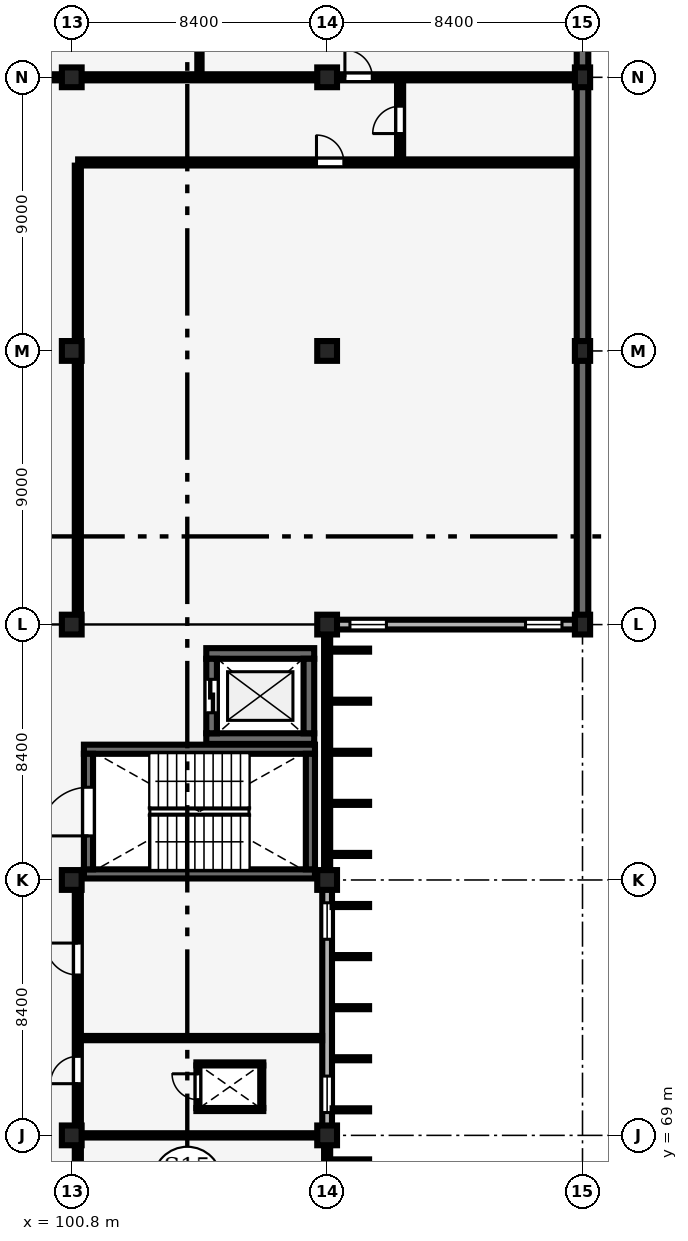
"""IFC4 building model, lengths in metres.
Left out: names, types, materials, properties, quantities, classifications, styles, units other than length and angle.
Written with IfcOpenShell. Run it as: python <this file> out.ifc"""

import sys

from ifc_helpers import new_model, si_unit, direction, frame, frame_2d, origin, origin_2d, place, context, subcontext, project, spatial, rectangle, extrude, element, fill, save


model = new_model("IFC4")
c1 = context("Model", 3, precision=1e-05, world=origin(), true_north=direction((0.0, 1.0)))
c2 = subcontext(c1, "Body", "Model", "MODEL_VIEW")
j1 = project(units=[si_unit("LENGTHUNIT", "METRE"), si_unit("PLANEANGLEUNIT", "RADIAN")], contexts=[c1])
p1 = place(None, origin())
s1 = spatial("IfcSite", under=j1, at=p1, CompositionType="ELEMENT")
p2 = place(p1, origin())
s2 = spatial("IfcBuilding", under=s1, at=p2, CompositionType="ELEMENT")
p3 = place(p2, frame((0.0, 0.0, 4.8)))
s3 = spatial("IfcBuildingStorey", under=s2, at=p3, CompositionType="ELEMENT", Elevation=4.8)
for number, where, z_axis, x_axis in (
    (1, (100.8, 69.0, 0.0), (0.0, 0.0, 1.0), (1.0, 0.0, 0.0)),
    (2, (100.8, 77.4, 0.0), (0.0, 0.0, 1.0), (1.0, 0.0, 0.0)),
    (3, (100.8, 85.8, 0.0), (0.0, 0.0, 1.0), (1.0, 0.0, 0.0)),
    (4, (100.8, 94.8, 0.0), (0.0, 0.0, 1.0), (1.0, 0.0, 0.0)),
    (5, (100.8, 103.8, 0.0), (0.0, 0.0, 1.0), (1.0, 0.0, 0.0)),
    (6, (109.2, 69.0, 0.0), (0.0, 0.0, 1.0), (1.0, 0.0, 0.0)),
    (7, (109.2, 77.4, 0.0), (0.0, 0.0, 1.0), (1.0, 0.0, 0.0)),
    (8, (109.2, 85.8, 0.0), (0.0, 0.0, 1.0), (1.0, 0.0, 0.0)),
    (9, (109.2, 94.8, 0.0), (0.0, 0.0, 1.0), (1.0, 0.0, 0.0)),
    (10, (109.2, 103.8, 0.0), (0.0, 0.0, 1.0), (1.0, 0.0, 0.0)),
):
    element("IfcColumn", number, at=place(p3, frame(where, z_axis=z_axis, x_axis=x_axis)), inside=s3, PredefinedType="COLUMN", context=c2, shape_type="SweptSolid", body=[
        extrude(rectangle(XDim=0.65, YDim=0.65, at=origin_2d()), origin(), (0.0, 0.0, 1.0), 4.2),
    ])
for number, where, z_axis, x_axis in (
    (11, (117.6, 85.8, 0.0), (0.0, 0.0, 1.0), (1.0, 0.0, 0.0)),
    (12, (117.6, 94.8, 0.0), (0.0, 0.0, 1.0), (1.0, 0.0, 0.0)),
    (13, (117.6, 103.8, 0.0), (0.0, 0.0, 1.0), (1.0, 0.0, 0.0)),
):
    element("IfcColumn", number, at=place(p3, frame(where, z_axis=z_axis, x_axis=x_axis)), inside=s3, PredefinedType="COLUMN", context=c2, shape_type="SweptSolid", body=[
        extrude(rectangle(XDim=0.5, YDim=0.65, at=origin_2d()), origin(), (0.0, 0.0, 1.0), 4.2),
    ])
p4 = place(p3, frame((109.2, 69.3, 0.0), z_axis=(0.0, 0.0, 1.0), x_axis=(0.0, 1.0, 0.0)))
e14 = element("IfcWall", 14, at=p4, inside=s3, PredefinedType="SOLIDWALL", context=c2, shape_type="SweptSolid", body=[
    extrude(rectangle(XDim=7.8, YDim=0.32, at=frame_2d((3.9, 0.0))), origin(), (0.0, 0.0, 1.0), 3.25),
])
p5 = place(p4, frame((0.45, 0.0, 0.85)))
e15 = element("IfcOpeningElement", 15, at=p5, cuts=e14, PredefinedType="OPENING", context=c2, shape_type="SweptSolid", body=[
    extrude(rectangle(XDim=1.2, YDim=1.8, at=frame_2d((0.6, 0.9))), frame((0.0, 0.17, 0.0), z_axis=(0.0, -1.0, 0.0), x_axis=(1.0, 0.0, 0.0)), (0.0, 0.0, 1.0), 0.34),
])
p6 = place(p4, frame((6.15, 0.0, 0.85)))
e16 = element("IfcOpeningElement", 16, at=p6, cuts=e14, PredefinedType="OPENING", context=c2, shape_type="SweptSolid", body=[
    extrude(rectangle(XDim=1.2, YDim=1.8, at=frame_2d((0.6, 0.9))), frame((0.0, 0.17, 0.0), z_axis=(0.0, -1.0, 0.0), x_axis=(1.0, 0.0, 0.0)), (0.0, 0.0, 1.0), 0.34),
])
p7 = place(p3, frame((109.5, 85.8, 0.0), z_axis=(0.0, 0.0, 1.0), x_axis=(1.0, 0.0, 0.0)))
e17 = element("IfcWall", 17, at=p7, inside=s3, PredefinedType="SOLIDWALL", context=c2, shape_type="SweptSolid", body=[
    extrude(rectangle(XDim=7.875, YDim=0.32, at=frame_2d((3.938, 0.0))), origin(), (0.0, 0.0, 1.0), 3.48),
])
p8 = place(p7, frame((0.45, 0.0, 0.9)))
e18 = element("IfcOpeningElement", 18, at=p8, cuts=e17, PredefinedType="OPENING", context=c2, shape_type="SweptSolid", body=[
    extrude(rectangle(XDim=1.2, YDim=1.5, at=frame_2d((0.6, 0.75))), frame((0.0, 0.17, 0.0), z_axis=(0.0, -1.0, 0.0), x_axis=(1.0, 0.0, 0.0)), (0.0, 0.0, 1.0), 0.34),
])
p9 = place(p7, frame((6.225, 0.0, 0.9)))
e19 = element("IfcOpeningElement", 19, at=p9, cuts=e17, PredefinedType="OPENING", context=c2, shape_type="SweptSolid", body=[
    extrude(rectangle(XDim=1.2, YDim=1.8, at=frame_2d((0.6, 0.9))), frame((0.0, 0.17, 0.0), z_axis=(0.0, -1.0, 0.0), x_axis=(1.0, 0.0, 0.0)), (0.0, 0.0, 1.0), 0.34),
])
p10 = place(p3, frame((117.6, 86.1, 0.0), z_axis=(0.0, 0.0, 1.0), x_axis=(0.0, 1.0, 0.0)))
e20 = element("IfcWall", 20, at=p10, inside=s3, PredefinedType="SHEAR", context=c2, shape_type="SweptSolid", body=[
    extrude(rectangle(XDim=8.4, YDim=0.38, at=frame_2d((4.2, 0.0))), origin(), (0.0, 0.0, 1.0), 3.48),
])
for number, where, z_axis, x_axis in (
    (21, (117.6, 95.1, 0.0), (0.0, 0.0, 1.0), (0.0, 1.0, 0.0)),
    (22, (117.6, 104.1, 0.0), (0.0, 0.0, 1.0), (0.0, 1.0, 0.0)),
):
    element("IfcWall", number, at=place(p3, frame(where, z_axis=z_axis, x_axis=x_axis)), inside=s3, PredefinedType="SHEAR", context=c2, shape_type="SweptSolid", body=[
        extrude(rectangle(XDim=8.4, YDim=0.38, at=frame_2d((4.2, 0.0))), origin(), (0.0, 0.0, 1.0), 2.97),
    ])
for number, where, z_axis, x_axis in (
    (23, (101.2, 77.6, 0.0), (0.0, 0.0, 1.0), (1.0, 0.0, 0.0)),
    (24, (101.2, 81.7, 0.0), (0.0, 0.0, 1.0), (1.0, 0.0, 0.0)),
):
    element("IfcWall", number, at=place(p3, frame(where, z_axis=z_axis, x_axis=x_axis)), inside=s3, PredefinedType="SHEAR", context=c2, shape_type="SweptSolid", body=[
        extrude(rectangle(XDim=7.6, YDim=0.3, at=frame_2d((3.8, 0.0))), origin(), (0.0, 0.0, 1.0), 4.025),
    ])
p11 = place(p3, frame((101.35, 77.75, 0.0), z_axis=(0.0, 0.0, 1.0), x_axis=(0.0, 1.0, 0.0)))
e25 = element("IfcWall", 25, at=p11, inside=s3, PredefinedType="SHEAR", context=c2, shape_type="SweptSolid", body=[
    extrude(rectangle(XDim=3.8, YDim=0.3, at=frame_2d((1.9, 0.0))), origin(), (0.0, 0.0, 1.0), 4.025),
])
p12 = place(p11, frame((1.1, 0.0, 0.0)))
e26 = element("IfcOpeningElement", 26, at=p12, cuts=e25, PredefinedType="OPENING", context=c2, shape_type="SweptSolid", body=[
    extrude(rectangle(XDim=1.6, YDim=2.2, at=frame_2d((0.8, 1.1))), frame((0.0, 0.16, 0.0), z_axis=(0.0, -1.0, 0.0), x_axis=(1.0, 0.0, 0.0)), (0.0, 0.0, 1.0), 0.32),
])
p13 = place(p3, frame((108.65, 77.75, 0.0), z_axis=(0.0, 0.0, 1.0), x_axis=(0.0, 1.0, 0.0)))
e27 = element("IfcWall", 27, at=p13, inside=s3, PredefinedType="SHEAR", context=c2, shape_type="SweptSolid", body=[
    extrude(rectangle(XDim=3.8, YDim=0.3, at=frame_2d((1.9, 0.0))), origin(), (0.0, 0.0, 1.0), 4.025),
])
for number, where, z_axis, x_axis in (
    (28, (105.225, 82.05, 0.0), (0.0, 0.0, 1.0), (1.0, 0.0, 0.0)),
    (29, (105.225, 84.85, 0.0), (0.0, 0.0, 1.0), (1.0, 0.0, 0.0)),
):
    element("IfcWall", number, at=place(p3, frame(where, z_axis=z_axis, x_axis=x_axis)), inside=s3, PredefinedType="SHEAR", context=c2, shape_type="SweptSolid", body=[
        extrude(rectangle(XDim=3.55, YDim=0.35, at=frame_2d((1.775, 0.0))), origin(), (0.0, 0.0, 1.0), 3.92),
    ])
p14 = place(p3, frame((105.4, 82.225, 0.0), z_axis=(0.0, 0.0, 1.0), x_axis=(0.0, 1.0, 0.0)))
e30 = element("IfcWall", 30, at=p14, inside=s3, PredefinedType="SHEAR", context=c2, shape_type="SweptSolid", body=[
    extrude(rectangle(XDim=2.45, YDim=0.35, at=frame_2d((1.225, 0.0))), origin(), (0.0, 0.0, 1.0), 3.92),
])
p15 = place(p14, frame((0.675, 0.0, 0.0)))
e31 = element("IfcOpeningElement", 31, at=p15, cuts=e30, PredefinedType="OPENING", context=c2, shape_type="SweptSolid", body=[
    extrude(rectangle(XDim=1.1, YDim=2.2, at=frame_2d((0.55, 1.1))), frame((0.0, 0.185, 0.0), z_axis=(0.0, -1.0, 0.0), x_axis=(1.0, 0.0, 0.0)), (0.0, 0.0, 1.0), 0.37),
])
p16 = place(p3, frame((108.6, 82.225, 0.0), z_axis=(0.0, 0.0, 1.0), x_axis=(0.0, 1.0, 0.0)))
e32 = element("IfcWall", 32, at=p16, inside=s3, PredefinedType="SHEAR", context=c2, shape_type="SweptSolid", body=[
    extrude(rectangle(XDim=2.45, YDim=0.35, at=frame_2d((1.225, 0.0))), origin(), (0.0, 0.0, 1.0), 3.92),
])
for number, where, z_axis, x_axis in (
    (33, (104.9, 69.85, 0.0), (0.0, 0.0, 1.0), (1.0, 0.0, 0.0)),
    (34, (104.9, 71.35, 0.0), (0.0, 0.0, 1.0), (1.0, 0.0, 0.0)),
):
    element("IfcWall", number, at=place(p3, frame(where, z_axis=z_axis, x_axis=x_axis)), inside=s3, PredefinedType="PARTITIONING", context=c2, shape_type="SweptSolid", body=[
        extrude(rectangle(XDim=2.2, YDim=0.1, at=frame_2d((1.1, 0.0))), origin(), (0.0, 0.0, 1.0), 3.9),
    ])
p17 = place(p3, frame((104.95, 69.9, 0.0), z_axis=(0.0, 0.0, 1.0), x_axis=(0.0, 1.0, 0.0)))
e35 = element("IfcWall", 35, at=p17, inside=s3, PredefinedType="PARTITIONING", context=c2, shape_type="SweptSolid", body=[
    extrude(rectangle(XDim=1.4, YDim=0.1, at=frame_2d((0.7, 0.0))), origin(), (0.0, 0.0, 1.0), 3.9),
])
p18 = place(p17, frame((0.275, 0.0, 0.0)))
e36 = element("IfcOpeningElement", 36, at=p18, cuts=e35, PredefinedType="OPENING", context=c2, shape_type="SweptSolid", body=[
    extrude(rectangle(XDim=0.85, YDim=2.05, at=frame_2d((0.425, 1.025))), frame((0.0, 0.06, 0.0), z_axis=(0.0, -1.0, 0.0), x_axis=(1.0, 0.0, 0.0)), (0.0, 0.0, 1.0), 0.12),
])
p19 = place(p3, frame((107.05, 69.9, 0.0), z_axis=(0.0, 0.0, 1.0), x_axis=(0.0, 1.0, 0.0)))
e37 = element("IfcWall", 37, at=p19, inside=s3, PredefinedType="PARTITIONING", context=c2, shape_type="SweptSolid", body=[
    extrude(rectangle(XDim=1.4, YDim=0.1, at=frame_2d((0.7, 0.0))), origin(), (0.0, 0.0, 1.0), 3.9),
])
p20 = place(p3, frame((111.6, 101.01, 0.0), z_axis=(0.0, 0.0, 1.0), x_axis=(0.0, 1.0, 0.0)))
e38 = element("IfcWall", 38, at=p20, inside=s3, PredefinedType="PARTITIONING", context=c2, shape_type="SweptSolid", body=[
    extrude(rectangle(XDim=2.78, YDim=0.2, at=frame_2d((1.39, 0.0))), origin(), (0.0, 0.0, 1.0), 3.9),
])
p21 = place(p20, frame((0.94, 0.0, 0.0)))
e39 = element("IfcOpeningElement", 39, at=p21, cuts=e38, PredefinedType="OPENING", context=c2, shape_type="SweptSolid", body=[
    extrude(rectangle(XDim=0.9, YDim=2.1, at=frame_2d((0.45, 1.05))), frame((0.0, 0.11, 0.0), z_axis=(0.0, -1.0, 0.0), x_axis=(1.0, 0.0, 0.0)), (0.0, 0.0, 1.0), 0.22),
])
p22 = place(p3, frame((105.0, 103.905, 0.0), z_axis=(0.0, 0.0, 1.0), x_axis=(0.0, 1.0, 0.0)))
e40 = element("IfcWall", 40, at=p22, inside=s3, PredefinedType="PARTITIONING", context=c2, shape_type="SweptSolid", body=[
    extrude(rectangle(XDim=8.79, YDim=0.14, at=frame_2d((4.395, 0.0))), origin(), (0.0, 0.0, 1.0), 3.9),
])
p23 = place(p3, frame((92.735, 103.8, 0.0), z_axis=(0.0, 0.0, 1.0), x_axis=(1.0, 0.0, 0.0)))
e41 = element("IfcWall", 41, at=p23, inside=s3, PredefinedType="PARTITIONING", context=c2, shape_type="SweptSolid", body=[
    extrude(rectangle(XDim=7.73, YDim=0.2, at=frame_2d((3.865, 0.0))), origin(), (0.0, 0.0, 1.0), 3.17),
])
p24 = place(p23, frame((5.515, 0.0, 0.0)))
e42 = element("IfcOpeningElement", 42, at=p24, cuts=e41, PredefinedType="OPENING", context=c2, shape_type="SweptSolid", body=[
    extrude(rectangle(XDim=0.9, YDim=2.1, at=frame_2d((0.45, 1.05))), frame((0.0, 0.11, 0.0), z_axis=(0.0, -1.0, 0.0), x_axis=(1.0, 0.0, 0.0)), (0.0, 0.0, 1.0), 0.22),
])
p25 = place(p3, frame((101.135, 103.8, 0.0), z_axis=(0.0, 0.0, 1.0), x_axis=(1.0, 0.0, 0.0)))
e43 = element("IfcWall", 43, at=p25, inside=s3, PredefinedType="PARTITIONING", context=c2, shape_type="SweptSolid", body=[
    extrude(rectangle(XDim=7.73, YDim=0.2, at=frame_2d((3.865, 0.0))), origin(), (0.0, 0.0, 1.0), 3.12),
])
p26 = place(p3, frame((109.535, 103.8, 0.0), z_axis=(0.0, 0.0, 1.0), x_axis=(1.0, 0.0, 0.0)))
e44 = element("IfcWall", 44, at=p26, inside=s3, PredefinedType="PARTITIONING", context=c2, shape_type="SweptSolid", body=[
    extrude(rectangle(XDim=7.87, YDim=0.2, at=frame_2d((3.935, 0.0))), origin(), (0.0, 0.0, 1.0), 3.17),
])
p27 = place(p26, frame((0.25, 0.0, 0.0)))
e45 = element("IfcOpeningElement", 45, at=p27, cuts=e44, PredefinedType="OPENING", context=c2, shape_type="SweptSolid", body=[
    extrude(rectangle(XDim=0.9, YDim=2.1, at=frame_2d((0.45, 1.05))), frame((0.0, 0.11, 0.0), z_axis=(0.0, -1.0, 0.0), x_axis=(1.0, 0.0, 0.0)), (0.0, 0.0, 1.0), 0.22),
])
p28 = place(p3, frame((101.01, 101.0, 0.0), z_axis=(0.0, 0.0, 1.0), x_axis=(1.0, 0.0, 0.0)))
e46 = element("IfcWall", 46, at=p28, inside=s3, PredefinedType="PARTITIONING", context=c2, shape_type="SweptSolid", body=[
    extrude(rectangle(XDim=16.395, YDim=0.2, at=frame_2d((8.198, 0.0))), origin(), (0.0, 0.0, 1.0), 3.44),
])
p29 = place(p28, frame((7.84, 0.0, 0.0)))
e47 = element("IfcOpeningElement", 47, at=p29, cuts=e46, PredefinedType="OPENING", context=c2, shape_type="SweptSolid", body=[
    extrude(rectangle(XDim=0.9, YDim=2.1, at=frame_2d((0.45, 1.05))), frame((0.0, 0.11, 0.0), z_axis=(0.0, -1.0, 0.0), x_axis=(1.0, 0.0, 0.0)), (0.0, 0.0, 1.0), 0.22),
])
p30 = place(p3, frame((101.0, 86.135, 0.0), z_axis=(0.0, 0.0, 1.0), x_axis=(0.0, 1.0, 0.0)))
e48 = element("IfcWall", 48, at=p30, inside=s3, PredefinedType="PARTITIONING", context=c2, shape_type="SweptSolid", body=[
    extrude(rectangle(XDim=8.33, YDim=0.2, at=frame_2d((4.165, 0.0))), origin(), (0.0, 0.0, 1.0), 2.95),
])
p31 = place(p3, frame((101.0, 95.135, 0.0), z_axis=(0.0, 0.0, 1.0), x_axis=(0.0, 1.0, 0.0)))
e49 = element("IfcWall", 49, at=p31, inside=s3, PredefinedType="PARTITIONING", context=c2, shape_type="SweptSolid", body=[
    extrude(rectangle(XDim=5.76, YDim=0.2, at=frame_2d((2.88, 0.0))), origin(), (0.0, 0.0, 1.0), 2.97),
])
p32 = place(p3, frame((101.105, 69.0, 0.0), z_axis=(0.0, 0.0, 1.0), x_axis=(1.0, 0.0, 0.0)))
e50 = element("IfcWall", 50, at=p32, inside=s3, PredefinedType="PARTITIONING", context=c2, shape_type="SweptSolid", body=[
    extrude(rectangle(XDim=7.99, YDim=0.14, at=frame_2d((3.995, 0.0))), origin(), (0.0, 0.0, 1.0), 3.15),
])
p33 = place(p3, frame((101.105, 72.2, 0.0), z_axis=(0.0, 0.0, 1.0), x_axis=(1.0, 0.0, 0.0)))
e51 = element("IfcWall", 51, at=p33, inside=s3, PredefinedType="PARTITIONING", context=c2, shape_type="SweptSolid", body=[
    extrude(rectangle(XDim=7.93, YDim=0.14, at=frame_2d((3.965, 0.0))), origin(), (0.0, 0.0, 1.0), 3.9),
])
p34 = place(p3, frame((101.0, 60.935, 0.0), z_axis=(0.0, 0.0, 1.0), x_axis=(0.0, 1.0, 0.0)))
e52 = element("IfcWall", 52, at=p34, inside=s3, PredefinedType="PARTITIONING", context=c2, shape_type="SweptSolid", body=[
    extrude(rectangle(XDim=7.73, YDim=0.2, at=frame_2d((3.865, 0.0))), origin(), (0.0, 0.0, 1.0), 3.05),
])
p35 = place(p3, frame((101.0, 69.335, 0.0), z_axis=(0.0, 0.0, 1.0), x_axis=(0.0, 1.0, 0.0)))
e53 = element("IfcWall", 53, at=p35, inside=s3, PredefinedType="PARTITIONING", context=c2, shape_type="SweptSolid", body=[
    extrude(rectangle(XDim=7.73, YDim=0.2, at=frame_2d((3.865, 0.0))), origin(), (0.0, 0.0, 1.0), 3.05),
])
p36 = place(p35, frame((1.365, 0.0, 0.0)))
e54 = element("IfcOpeningElement", 54, at=p36, cuts=e53, PredefinedType="OPENING", context=c2, shape_type="SweptSolid", body=[
    extrude(rectangle(XDim=0.9, YDim=2.1, at=frame_2d((0.45, 1.05))), frame((0.0, 0.11, 0.0), z_axis=(0.0, -1.0, 0.0), x_axis=(1.0, 0.0, 0.0)), (0.0, 0.0, 1.0), 0.22),
])
p37 = place(p35, frame((4.94, 0.0, 0.0)))
e55 = element("IfcOpeningElement", 55, at=p37, cuts=e53, PredefinedType="OPENING", context=c2, shape_type="SweptSolid", body=[
    extrude(rectangle(XDim=1.05, YDim=2.2, at=frame_2d((0.525, 1.1))), frame((0.0, 0.11, 0.0), z_axis=(0.0, -1.0, 0.0), x_axis=(1.0, 0.0, 0.0)), (0.0, 0.0, 1.0), 0.22),
])
p38 = place(p5, origin())
e56 = element("IfcWindow", 56, at=p38, inside=s3, PartitioningType="SINGLE_PANEL", PredefinedType="WINDOW", context=c2, shape_type="SweptSolid", body=[
    extrude(rectangle(XDim=1.2, YDim=1.8, at=frame_2d((0.6, 0.9))), frame((0.0, 0.03, 0.0), z_axis=(0.0, -1.0, 0.0), x_axis=(1.0, 0.0, 0.0)), (0.0, 0.0, 1.0), 0.06),
])
fill(e15, e56)
p39 = place(p6, origin())
e57 = element("IfcWindow", 57, at=p39, inside=s3, PartitioningType="SINGLE_PANEL", PredefinedType="WINDOW", context=c2, shape_type="SweptSolid", body=[
    extrude(rectangle(XDim=1.2, YDim=1.8, at=frame_2d((0.6, 0.9))), frame((0.0, 0.03, 0.0), z_axis=(0.0, -1.0, 0.0), x_axis=(1.0, 0.0, 0.0)), (0.0, 0.0, 1.0), 0.06),
])
fill(e16, e57)
p40 = place(p8, origin())
e58 = element("IfcWindow", 58, at=p40, inside=s3, PartitioningType="SINGLE_PANEL", PredefinedType="WINDOW", context=c2, shape_type="SweptSolid", body=[
    extrude(rectangle(XDim=1.2, YDim=1.5, at=frame_2d((0.6, 0.75))), frame((0.0, 0.03, 0.0), z_axis=(0.0, -1.0, 0.0), x_axis=(1.0, 0.0, 0.0)), (0.0, 0.0, 1.0), 0.06),
])
fill(e18, e58)
p41 = place(p9, origin())
e59 = element("IfcWindow", 59, at=p41, inside=s3, PartitioningType="SINGLE_PANEL", PredefinedType="WINDOW", context=c2, shape_type="SweptSolid", body=[
    extrude(rectangle(XDim=1.2, YDim=1.8, at=frame_2d((0.6, 0.9))), frame((0.0, 0.03, 0.0), z_axis=(0.0, -1.0, 0.0), x_axis=(1.0, 0.0, 0.0)), (0.0, 0.0, 1.0), 0.06),
])
fill(e19, e59)
p42 = place(p12, origin())
e60 = element("IfcDoor", 60, at=p42, inside=s3, OperationType="DOUBLE_DOOR_SINGLE_SWING", PredefinedType="DOOR", context=c2, shape_type="SweptSolid", body=[
    extrude(rectangle(XDim=1.6, YDim=2.2, at=frame_2d((0.8, 1.1))), frame((0.0, 0.025, 0.0), z_axis=(0.0, -1.0, 0.0), x_axis=(1.0, 0.0, 0.0)), (0.0, 0.0, 1.0), 0.05),
])
fill(e26, e60)
p43 = place(p15, origin())
e61 = element("IfcDoor", 61, at=p43, inside=s3, OperationType="DOUBLE_DOOR_SLIDING", PredefinedType="DOOR", context=c2, shape_type="SweptSolid", body=[
    extrude(rectangle(XDim=1.1, YDim=2.2, at=frame_2d((0.55, 1.1))), frame((0.0, 0.025, 0.0), z_axis=(0.0, -1.0, 0.0), x_axis=(1.0, 0.0, 0.0)), (0.0, 0.0, 1.0), 0.05),
])
fill(e31, e61)
p44 = place(p18, origin())
e62 = element("IfcDoor", 62, at=p44, inside=s3, OperationType="SINGLE_SWING_RIGHT", PredefinedType="DOOR", context=c2, shape_type="SweptSolid", body=[
    extrude(rectangle(XDim=0.85, YDim=2.05, at=frame_2d((0.425, 1.025))), frame((0.0, 0.025, 0.0), z_axis=(0.0, -1.0, 0.0), x_axis=(1.0, 0.0, 0.0)), (0.0, 0.0, 1.0), 0.05),
])
fill(e36, e62)
p45 = place(p21, origin())
e63 = element("IfcDoor", 63, at=p45, inside=s3, OperationType="SINGLE_SWING_LEFT", PredefinedType="DOOR", context=c2, shape_type="SweptSolid", body=[
    extrude(rectangle(XDim=0.9, YDim=2.1, at=frame_2d((0.45, 1.05))), frame((0.0, 0.025, 0.0), z_axis=(0.0, -1.0, 0.0), x_axis=(1.0, 0.0, 0.0)), (0.0, 0.0, 1.0), 0.05),
])
fill(e39, e63)
p46 = place(p27, origin())
e64 = element("IfcDoor", 64, at=p46, inside=s3, OperationType="SINGLE_SWING_LEFT", PredefinedType="DOOR", context=c2, shape_type="SweptSolid", body=[
    extrude(rectangle(XDim=0.9, YDim=2.1, at=frame_2d((0.45, 1.05))), frame((0.0, 0.025, 0.0), z_axis=(0.0, -1.0, 0.0), x_axis=(1.0, 0.0, 0.0)), (0.0, 0.0, 1.0), 0.05),
])
fill(e45, e64)
p47 = place(p29, origin())
e65 = element("IfcDoor", 65, at=p47, inside=s3, OperationType="SINGLE_SWING_LEFT", PredefinedType="DOOR", context=c2, shape_type="SweptSolid", body=[
    extrude(rectangle(XDim=0.9, YDim=2.1, at=frame_2d((0.45, 1.05))), frame((0.0, 0.025, 0.0), z_axis=(0.0, -1.0, 0.0), x_axis=(1.0, 0.0, 0.0)), (0.0, 0.0, 1.0), 0.05),
])
fill(e47, e65)
p48 = place(p36, origin())
e66 = element("IfcDoor", 66, at=p48, inside=s3, OperationType="SINGLE_SWING_LEFT", PredefinedType="DOOR", context=c2, shape_type="SweptSolid", body=[
    extrude(rectangle(XDim=0.9, YDim=2.1, at=frame_2d((0.45, 1.05))), frame((0.0, 0.025, 0.0), z_axis=(0.0, -1.0, 0.0), x_axis=(1.0, 0.0, 0.0)), (0.0, 0.0, 1.0), 0.05),
])
fill(e54, e66)
p49 = place(p37, origin())
e67 = element("IfcDoor", 67, at=p49, inside=s3, OperationType="SINGLE_SWING_RIGHT", PredefinedType="DOOR", context=c2, shape_type="SweptSolid", body=[
    extrude(rectangle(XDim=1.05, YDim=2.2, at=frame_2d((0.525, 1.1))), frame((0.0, 0.025, 0.0), z_axis=(0.0, -1.0, 0.0), x_axis=(1.0, 0.0, 0.0)), (0.0, 0.0, 1.0), 0.05),
])
fill(e55, e67)
save(model, sys.argv[1])
